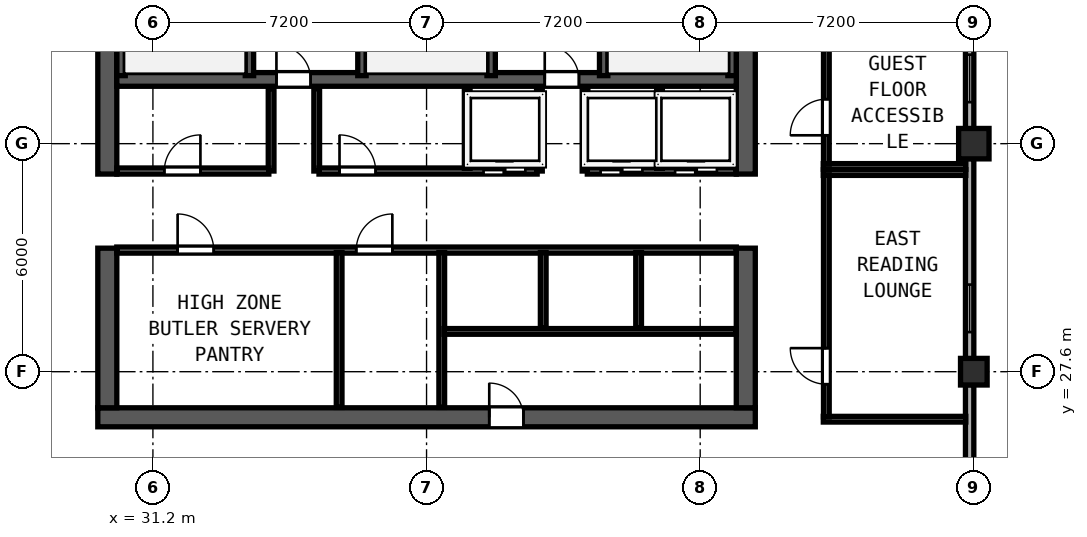
"""IFC4 building model, lengths in metres.
Left out: names, types, materials, properties, quantities, classifications, styles, units other than length and angle.
Written with IfcOpenShell. Run it as: python <this file> out.ifc"""

import sys

from ifc_helpers import new_model, si_unit, direction, frame, frame_2d, origin, origin_2d, place, context, subcontext, project, spatial, rectangle, hollow_rectangle, extrude, element, fill, save


model = new_model("IFC4")
c1 = context("Model", 3, precision=1e-05, world=origin(), true_north=direction((0.0, 1.0)))
c2 = subcontext(c1, "Body", "Model", "MODEL_VIEW")
j1 = project(units=[si_unit("LENGTHUNIT", "METRE"), si_unit("PLANEANGLEUNIT", "RADIAN")], contexts=[c1])
p1 = place(None, origin())
s1 = spatial("IfcSite", under=j1, at=p1, CompositionType="ELEMENT")
p2 = place(p1, origin())
s2 = spatial("IfcBuilding", under=s1, at=p2, CompositionType="ELEMENT")
p3 = place(p2, frame((0.0, 0.0, 262.15)))
s3 = spatial("IfcBuildingStorey", under=s2, at=p3, CompositionType="ELEMENT", Elevation=262.15)
p4 = place(p3, frame((29.75, 26.4, 0.0), z_axis=(0.0, 0.0, 1.0), x_axis=(1.0, 0.0, 0.0)))
e1 = element("IfcWall", 1, at=p4, inside=s3, PredefinedType="SHEAR", context=c2, shape_type="SweptSolid", body=[
    extrude(rectangle(XDim=17.3, YDim=0.5, at=frame_2d((8.65, 0.0))), origin(), (0.0, 0.0, 1.0), 3.67),
])
p5 = place(p4, frame((11.2, 0.0, 0.0), z_axis=(0.0, 0.0, 1.0), x_axis=(-1.0, 0.0, 0.0)))
e2 = element("IfcOpeningElement", 2, at=p5, cuts=e1, PredefinedType="OPENING", context=c2, shape_type="SweptSolid", body=[
    extrude(rectangle(XDim=0.9, YDim=2.1, at=frame_2d((0.45, 1.05))), frame((0.0, 0.26, 0.0), z_axis=(0.0, -1.0, 0.0), x_axis=(1.0, 0.0, 0.0)), (0.0, 0.0, 1.0), 0.52),
])
p6 = place(p3, frame((30.0, 26.65, 0.0), z_axis=(0.0, 0.0, 1.0), x_axis=(0.0, 1.0, 0.0)))
e3 = element("IfcWall", 3, at=p6, inside=s3, PredefinedType="SHEAR", context=c2, shape_type="SweptSolid", body=[
    extrude(rectangle(XDim=4.2, YDim=0.5, at=frame_2d((2.1, 0.0))), origin(), (0.0, 0.0, 1.0), 3.67),
])
p7 = place(p3, frame((30.0, 32.8, 0.0), z_axis=(0.0, 0.0, 1.0), x_axis=(0.0, 1.0, 0.0)))
e4 = element("IfcWall", 4, at=p7, inside=s3, PredefinedType="SHEAR", context=c2, shape_type="SweptSolid", body=[
    extrude(rectangle(XDim=10.15, YDim=0.5, at=frame_2d((5.075, 0.0))), origin(), (0.0, 0.0, 1.0), 3.67),
])
p8 = place(p3, frame((46.8, 26.65, 0.0), z_axis=(0.0, 0.0, 1.0), x_axis=(0.0, 1.0, 0.0)))
e5 = element("IfcWall", 5, at=p8, inside=s3, PredefinedType="SHEAR", context=c2, shape_type="SweptSolid", body=[
    extrude(rectangle(XDim=4.2, YDim=0.5, at=frame_2d((2.1, 0.0))), origin(), (0.0, 0.0, 1.0), 3.67),
])
p9 = place(p3, frame((46.8, 32.8, 0.0), z_axis=(0.0, 0.0, 1.0), x_axis=(0.0, 1.0, 0.0)))
e6 = element("IfcWall", 6, at=p9, inside=s3, PredefinedType="SHEAR", context=c2, shape_type="SweptSolid", body=[
    extrude(rectangle(XDim=10.15, YDim=0.5, at=frame_2d((5.075, 0.0))), origin(), (0.0, 0.0, 1.0), 3.67),
])
p10 = place(p3, frame((30.25, 35.29, 0.0), z_axis=(0.0, 0.0, 1.0), x_axis=(1.0, 0.0, 0.0)))
e7 = element("IfcWall", 7, at=p10, inside=s3, PredefinedType="SHEAR", context=c2, shape_type="SweptSolid", body=[
    extrude(rectangle(XDim=16.3, YDim=0.36, at=frame_2d((8.15, 0.0))), origin(), (0.0, 0.0, 1.0), 3.67),
])
p11 = place(p10, frame((5.1, 0.0, 0.0), z_axis=(0.0, 0.0, 1.0), x_axis=(-1.0, 0.0, 0.0)))
e8 = element("IfcOpeningElement", 8, at=p11, cuts=e7, PredefinedType="OPENING", context=c2, shape_type="SweptSolid", body=[
    extrude(rectangle(XDim=0.9, YDim=2.1, at=frame_2d((0.45, 1.05))), frame((0.0, 0.19, 0.0), z_axis=(0.0, -1.0, 0.0), x_axis=(1.0, 0.0, 0.0)), (0.0, 0.0, 1.0), 0.38),
])
p12 = place(p10, frame((12.16, 0.0, 0.0), z_axis=(0.0, 0.0, 1.0), x_axis=(-1.0, 0.0, 0.0)))
e9 = element("IfcOpeningElement", 9, at=p12, cuts=e7, PredefinedType="OPENING", context=c2, shape_type="SweptSolid", body=[
    extrude(rectangle(XDim=0.9, YDim=2.1, at=frame_2d((0.45, 1.05))), frame((0.0, 0.19, 0.0), z_axis=(0.0, -1.0, 0.0), x_axis=(1.0, 0.0, 0.0)), (0.0, 0.0, 1.0), 0.38),
])
for number, where, z_axis, x_axis in (
    (10, (30.362, 35.39, 0.0), (0.0, 0.0, 1.0), (0.0, 1.0, 0.0)),
    (11, (33.74, 35.39, 0.0), (0.0, 0.0, 1.0), (0.0, 1.0, 0.0)),
    (12, (36.7, 35.39, 0.0), (0.0, 0.0, 1.0), (0.0, 1.0, 0.0)),
    (13, (40.1, 35.39, 0.0), (0.0, 0.0, 1.0), (0.0, 1.0, 0.0)),
    (14, (43.06, 35.39, 0.0), (0.0, 0.0, 1.0), (0.0, 1.0, 0.0)),
    (15, (46.438, 35.39, 0.0), (0.0, 0.0, 1.0), (0.0, 1.0, 0.0)),
):
    element("IfcWall", number, at=place(p3, frame(where, z_axis=z_axis, x_axis=x_axis)), inside=s3, PredefinedType="SHEAR", context=c2, shape_type="SweptSolid", body=[
        extrude(rectangle(XDim=7.56, YDim=0.22, at=frame_2d((3.78, 0.0))), origin(), (0.0, 0.0, 1.0), 3.67),
    ])
p13 = place(p3, frame((52.8, 33.6, 0.0), z_axis=(0.0, 0.0, 1.0), x_axis=(1.0, 0.0, 0.0)))
e16 = element("IfcColumn", 16, at=p13, inside=s3, PredefinedType="COLUMN", context=c2, shape_type="SweptSolid", body=[
    extrude(hollow_rectangle(XDim=0.8, YDim=0.8, WallThickness=0.03, at=origin_2d()), origin(), (0.0, 0.0, 1.0), 3.85),
])
p14 = place(p3, frame((52.8, 27.6, 0.0), z_axis=(0.0, 0.0, 1.0), x_axis=(1.0, 0.0, 0.0)))
e17 = element("IfcColumn", 17, at=p14, inside=s3, PredefinedType="COLUMN", context=c2, shape_type="SweptSolid", body=[
    extrude(hollow_rectangle(XDim=0.7, YDim=0.7, WallThickness=0.026, at=origin_2d()), origin(), (0.0, 0.0, 1.0), 3.85),
])
p15 = place(p3, frame((52.69, 21.992, 0.0), z_axis=(0.0, 0.0, 1.0), x_axis=(0.0, 1.0, 0.0)))
e18 = element("IfcWall", 18, at=p15, inside=s3, PredefinedType="SOLIDWALL", context=c2, shape_type="SweptSolid", body=[
    extrude(rectangle(XDim=5.266, YDim=0.22, at=frame_2d((2.633, 0.0))), origin(), (0.0, 0.0, 1.0), 3.315),
])
p16 = place(p15, frame((0.7, 0.0, 0.85)))
e19 = element("IfcOpeningElement", 19, at=p16, cuts=e18, PredefinedType="OPENING", context=c2, shape_type="SweptSolid", body=[
    extrude(rectangle(XDim=1.25, YDim=1.95, at=frame_2d((0.625, 0.975))), frame((0.0, 0.12, 0.0), z_axis=(0.0, -1.0, 0.0), x_axis=(1.0, 0.0, 0.0)), (0.0, 0.0, 1.0), 0.24),
])
p17 = place(p3, frame((52.69, 27.942, 0.0), z_axis=(0.0, 0.0, 1.0), x_axis=(0.0, 1.0, 0.0)))
e20 = element("IfcWall", 20, at=p17, inside=s3, PredefinedType="SOLIDWALL", context=c2, shape_type="SweptSolid", body=[
    extrude(rectangle(XDim=5.266, YDim=0.22, at=frame_2d((2.633, 0.0))), origin(), (0.0, 0.0, 1.0), 3.315),
])
p18 = place(p17, frame((0.7, 0.0, 0.85)))
e21 = element("IfcOpeningElement", 21, at=p18, cuts=e20, PredefinedType="OPENING", context=c2, shape_type="SweptSolid", body=[
    extrude(rectangle(XDim=1.25, YDim=1.95, at=frame_2d((0.625, 0.975))), frame((0.0, 0.12, 0.0), z_axis=(0.0, -1.0, 0.0), x_axis=(1.0, 0.0, 0.0)), (0.0, 0.0, 1.0), 0.24),
])
p19 = place(p3, frame((52.69, 33.992, 0.0), z_axis=(0.0, 0.0, 1.0), x_axis=(0.0, 1.0, 0.0)))
e22 = element("IfcWall", 22, at=p19, inside=s3, PredefinedType="SOLIDWALL", context=c2, shape_type="SweptSolid", body=[
    extrude(rectangle(XDim=5.266, YDim=0.22, at=frame_2d((2.633, 0.0))), origin(), (0.0, 0.0, 1.0), 3.315),
])
p20 = place(p19, frame((0.7, 0.0, 0.85)))
e23 = element("IfcOpeningElement", 23, at=p20, cuts=e22, PredefinedType="OPENING", context=c2, shape_type="SweptSolid", body=[
    extrude(rectangle(XDim=1.25, YDim=1.95, at=frame_2d((0.625, 0.975))), frame((0.0, 0.12, 0.0), z_axis=(0.0, -1.0, 0.0), x_axis=(1.0, 0.0, 0.0)), (0.0, 0.0, 1.0), 0.24),
])
for number, where, z_axis, x_axis in (
    (24, (34.31, 32.88, 0.0), (0.0, 0.0, 1.0), (0.0, 1.0, 0.0)),
    (25, (35.51, 32.88, 0.0), (0.0, 0.0, 1.0), (0.0, 1.0, 0.0)),
    (26, (41.37, 32.88, 0.0), (0.0, 0.0, 1.0), (0.0, 1.0, 0.0)),
    (27, (42.57, 32.88, 0.0), (0.0, 0.0, 1.0), (0.0, 1.0, 0.0)),
):
    element("IfcWall", number, at=place(p3, frame(where, z_axis=z_axis, x_axis=x_axis)), inside=s3, PredefinedType="SOLIDWALL", context=c2, shape_type="SweptSolid", body=[
        extrude(rectangle(XDim=2.17, YDim=0.15, at=frame_2d((1.085, 0.0))), origin(), (0.0, 0.0, 1.0), 3.67),
    ])
p21 = place(p3, frame((30.25, 32.88, 0.0), z_axis=(0.0, 0.0, 1.0), x_axis=(1.0, 0.0, 0.0)))
e28 = element("IfcWall", 28, at=p21, inside=s3, PredefinedType="SOLIDWALL", context=c2, shape_type="SweptSolid", body=[
    extrude(rectangle(XDim=4.0, YDim=0.16, at=frame_2d((2.0, 0.0))), origin(), (0.0, 0.0, 1.0), 3.67),
])
p22 = place(p21, frame((2.2, 0.0, 0.0), z_axis=(0.0, 0.0, 1.0), x_axis=(-1.0, 0.0, 0.0)))
e29 = element("IfcOpeningElement", 29, at=p22, cuts=e28, PredefinedType="OPENING", context=c2, shape_type="SweptSolid", body=[
    extrude(rectangle(XDim=0.95, YDim=2.12, at=frame_2d((0.475, 1.06))), frame((0.0, 0.09, 0.0), z_axis=(0.0, -1.0, 0.0), x_axis=(1.0, 0.0, 0.0)), (0.0, 0.0, 1.0), 0.18),
])
p23 = place(p3, frame((35.57, 32.88, 0.0), z_axis=(0.0, 0.0, 1.0), x_axis=(1.0, 0.0, 0.0)))
e30 = element("IfcWall", 30, at=p23, inside=s3, PredefinedType="SOLIDWALL", context=c2, shape_type="SweptSolid", body=[
    extrude(rectangle(XDim=5.74, YDim=0.16, at=frame_2d((2.87, 0.0))), origin(), (0.0, 0.0, 1.0), 3.67),
])
p24 = place(p23, frame((1.49, 0.0, 0.0), z_axis=(0.0, 0.0, 1.0), x_axis=(-1.0, 0.0, 0.0)))
e31 = element("IfcOpeningElement", 31, at=p24, cuts=e30, PredefinedType="OPENING", context=c2, shape_type="SweptSolid", body=[
    extrude(rectangle(XDim=0.95, YDim=2.12, at=frame_2d((0.475, 1.06))), frame((0.0, 0.09, 0.0), z_axis=(0.0, -1.0, 0.0), x_axis=(1.0, 0.0, 0.0)), (0.0, 0.0, 1.0), 0.18),
])
p25 = place(p23, frame((5.43, 0.0, 0.0), z_axis=(0.0, 0.0, 1.0), x_axis=(-1.0, 0.0, 0.0)))
e32 = element("IfcOpeningElement", 32, at=p25, cuts=e30, PredefinedType="OPENING", context=c2, shape_type="SweptSolid", body=[
    extrude(rectangle(XDim=1.1, YDim=2.2, at=frame_2d((0.55, 1.1))), frame((0.0, 0.09, 0.0), z_axis=(0.0, -1.0, 0.0), x_axis=(1.0, 0.0, 0.0)), (0.0, 0.0, 1.0), 0.18),
])
p26 = place(p3, frame((42.63, 32.88, 0.0), z_axis=(0.0, 0.0, 1.0), x_axis=(1.0, 0.0, 0.0)))
e33 = element("IfcWall", 33, at=p26, inside=s3, PredefinedType="SOLIDWALL", context=c2, shape_type="SweptSolid", body=[
    extrude(rectangle(XDim=3.92, YDim=0.16, at=frame_2d((1.96, 0.0))), origin(), (0.0, 0.0, 1.0), 3.67),
])
p27 = place(p26, frame((1.45, 0.0, 0.0), z_axis=(0.0, 0.0, 1.0), x_axis=(-1.0, 0.0, 0.0)))
e34 = element("IfcOpeningElement", 34, at=p27, cuts=e33, PredefinedType="OPENING", context=c2, shape_type="SweptSolid", body=[
    extrude(rectangle(XDim=1.1, YDim=2.2, at=frame_2d((0.55, 1.1))), frame((0.0, 0.09, 0.0), z_axis=(0.0, -1.0, 0.0), x_axis=(1.0, 0.0, 0.0)), (0.0, 0.0, 1.0), 0.18),
])
p28 = place(p26, frame((3.41, 0.0, 0.0), z_axis=(0.0, 0.0, 1.0), x_axis=(-1.0, 0.0, 0.0)))
e35 = element("IfcOpeningElement", 35, at=p28, cuts=e33, PredefinedType="OPENING", context=c2, shape_type="SweptSolid", body=[
    extrude(rectangle(XDim=1.1, YDim=2.2, at=frame_2d((0.55, 1.1))), frame((0.0, 0.09, 0.0), z_axis=(0.0, -1.0, 0.0), x_axis=(1.0, 0.0, 0.0)), (0.0, 0.0, 1.0), 0.18),
])
for number, where, z_axis, x_axis in (
    (36, (39.47, 32.95, 0.0), (0.0, 0.0, 1.0), (0.0, 1.0, 0.0)),
    (37, (44.53, 32.95, 0.0), (0.0, 0.0, 1.0), (0.0, 1.0, 0.0)),
):
    element("IfcWall", number, at=place(p3, frame(where, z_axis=z_axis, x_axis=x_axis)), inside=s3, PredefinedType="SOLIDWALL", context=c2, shape_type="SweptSolid", body=[
        extrude(rectangle(XDim=2.05, YDim=0.15, at=frame_2d((1.025, 0.0))), origin(), (0.0, 0.0, 1.0), 3.67),
    ])
p29 = place(p3, frame((30.25, 30.8, 0.0), z_axis=(0.0, 0.0, 1.0), x_axis=(1.0, 0.0, 0.0)))
e38 = element("IfcWall", 38, at=p29, inside=s3, PredefinedType="SOLIDWALL", context=c2, shape_type="SweptSolid", body=[
    extrude(rectangle(XDim=16.3, YDim=0.16, at=frame_2d((8.15, 0.0))), origin(), (0.0, 0.0, 1.0), 3.67),
])
p30 = place(p29, frame((1.6, 0.0, 0.0)))
e39 = element("IfcOpeningElement", 39, at=p30, cuts=e38, PredefinedType="OPENING", context=c2, shape_type="SweptSolid", body=[
    extrude(rectangle(XDim=0.95, YDim=2.12, at=frame_2d((0.475, 1.06))), frame((0.0, 0.09, 0.0), z_axis=(0.0, -1.0, 0.0), x_axis=(1.0, 0.0, 0.0)), (0.0, 0.0, 1.0), 0.18),
])
p31 = place(p29, frame((6.3, 0.0, 0.0)))
e40 = element("IfcOpeningElement", 40, at=p31, cuts=e38, PredefinedType="OPENING", context=c2, shape_type="SweptSolid", body=[
    extrude(rectangle(XDim=0.95, YDim=2.12, at=frame_2d((0.475, 1.06))), frame((0.0, 0.09, 0.0), z_axis=(0.0, -1.0, 0.0), x_axis=(1.0, 0.0, 0.0)), (0.0, 0.0, 1.0), 0.18),
])
p32 = place(p3, frame((38.8, 26.66, 0.0), z_axis=(0.0, 0.0, 1.0), x_axis=(0.0, 1.0, 0.0)))
e41 = element("IfcWall", 41, at=p32, inside=s3, PredefinedType="SOLIDWALL", context=c2, shape_type="SweptSolid", body=[
    extrude(rectangle(XDim=4.075, YDim=0.15, at=frame_2d((2.038, 0.0))), origin(), (0.0, 0.0, 1.0), 3.67),
])
p33 = place(p3, frame((36.1, 26.66, 0.0), z_axis=(0.0, 0.0, 1.0), x_axis=(0.0, 1.0, 0.0)))
e42 = element("IfcWall", 42, at=p33, inside=s3, PredefinedType="PARTITIONING", context=c2, shape_type="SweptSolid", body=[
    extrude(rectangle(XDim=4.075, YDim=0.15, at=frame_2d((2.038, 0.0))), origin(), (0.0, 0.0, 1.0), 3.67),
])
p34 = place(p3, frame((38.86, 28.66, 0.0), z_axis=(0.0, 0.0, 1.0), x_axis=(1.0, 0.0, 0.0)))
e43 = element("IfcWall", 43, at=p34, inside=s3, PredefinedType="PARTITIONING", context=c2, shape_type="SweptSolid", body=[
    extrude(rectangle(XDim=7.69, YDim=0.15, at=frame_2d((3.845, 0.0))), origin(), (0.0, 0.0, 1.0), 3.67),
])
for number, where, z_axis, x_axis in (
    (44, (41.47, 28.75, 0.0), (0.0, 0.0, 1.0), (0.0, 1.0, 0.0)),
    (45, (43.98, 28.75, 0.0), (0.0, 0.0, 1.0), (0.0, 1.0, 0.0)),
):
    element("IfcWall", number, at=place(p3, frame(where, z_axis=z_axis, x_axis=x_axis)), inside=s3, PredefinedType="SOLIDWALL", context=c2, shape_type="SweptSolid", body=[
        extrude(rectangle(XDim=1.985, YDim=0.15, at=frame_2d((0.993, 0.0))), origin(), (0.0, 0.0, 1.0), 3.67),
    ])
p35 = place(p3, frame((48.84, 33.0, 0.0), z_axis=(0.0, 0.0, 1.0), x_axis=(1.0, 0.0, 0.0)))
e46 = element("IfcWall", 46, at=p35, inside=s3, PredefinedType="PARTITIONING", context=c2, shape_type="SweptSolid", body=[
    extrude(rectangle(XDim=3.748, YDim=0.15, at=frame_2d((1.874, 0.0))), origin(), (0.0, 0.0, 1.0), 3.67),
])
p36 = place(p3, frame((48.92, 33.06, 0.0), z_axis=(0.0, 0.0, 1.0), x_axis=(0.0, 1.0, 0.0)))
e47 = element("IfcWall", 47, at=p36, inside=s3, PredefinedType="PARTITIONING", context=c2, shape_type="SweptSolid", body=[
    extrude(rectangle(XDim=3.18, YDim=0.15, at=frame_2d((1.59, 0.0))), origin(), (0.0, 0.0, 1.0), 3.67),
])
p37 = place(p36, frame((0.76, 0.0, 0.0)))
e48 = element("IfcOpeningElement", 48, at=p37, cuts=e47, PredefinedType="OPENING", context=c2, shape_type="SweptSolid", body=[
    extrude(rectangle(XDim=0.95, YDim=2.12, at=frame_2d((0.475, 1.06))), frame((0.0, 0.085, 0.0), z_axis=(0.0, -1.0, 0.0), x_axis=(1.0, 0.0, 0.0)), (0.0, 0.0, 1.0), 0.17),
])
for number, where, z_axis, x_axis in (
    (49, (48.84, 32.84, 0.0), (0.0, 0.0, 1.0), (1.0, 0.0, 0.0)),
    (50, (48.84, 26.35, 0.0), (0.0, 0.0, 1.0), (1.0, 0.0, 0.0)),
):
    element("IfcWall", number, at=place(p3, frame(where, z_axis=z_axis, x_axis=x_axis)), inside=s3, PredefinedType="PARTITIONING", context=c2, shape_type="SweptSolid", body=[
        extrude(rectangle(XDim=3.748, YDim=0.15, at=frame_2d((1.874, 0.0))), origin(), (0.0, 0.0, 1.0), 3.67),
    ])
p38 = place(p3, frame((48.92, 26.41, 0.0), z_axis=(0.0, 0.0, 1.0), x_axis=(0.0, 1.0, 0.0)))
e51 = element("IfcWall", 51, at=p38, inside=s3, PredefinedType="PARTITIONING", context=c2, shape_type="SweptSolid", body=[
    extrude(rectangle(XDim=6.37, YDim=0.15, at=frame_2d((3.185, 0.0))), origin(), (0.0, 0.0, 1.0), 3.67),
])
p39 = place(p38, frame((0.86, 0.0, 0.0)))
e52 = element("IfcOpeningElement", 52, at=p39, cuts=e51, PredefinedType="OPENING", context=c2, shape_type="SweptSolid", body=[
    extrude(rectangle(XDim=0.95, YDim=2.12, at=frame_2d((0.475, 1.06))), frame((0.0, 0.085, 0.0), z_axis=(0.0, -1.0, 0.0), x_axis=(1.0, 0.0, 0.0)), (0.0, 0.0, 1.0), 0.17),
])
p40 = place(p18, origin())
e53 = element("IfcWindow", 53, at=p40, inside=s3, PartitioningType="SINGLE_PANEL", PredefinedType="WINDOW", context=c2, shape_type="SweptSolid", body=[
    extrude(rectangle(XDim=1.25, YDim=1.95, at=frame_2d((0.625, 0.975))), frame((0.0, 0.03, 0.0), z_axis=(0.0, -1.0, 0.0), x_axis=(1.0, 0.0, 0.0)), (0.0, 0.0, 1.0), 0.06),
])
fill(e21, e53)
p41 = place(p20, origin())
e54 = element("IfcWindow", 54, at=p41, inside=s3, PartitioningType="SINGLE_PANEL", PredefinedType="WINDOW", context=c2, shape_type="SweptSolid", body=[
    extrude(rectangle(XDim=1.25, YDim=1.95, at=frame_2d((0.625, 0.975))), frame((0.0, 0.03, 0.0), z_axis=(0.0, -1.0, 0.0), x_axis=(1.0, 0.0, 0.0)), (0.0, 0.0, 1.0), 0.06),
])
fill(e23, e54)
p42 = place(p11, origin())
e55 = element("IfcDoor", 55, at=p42, inside=s3, OperationType="SINGLE_SWING_RIGHT", PredefinedType="DOOR", context=c2, shape_type="SweptSolid", body=[
    extrude(rectangle(XDim=0.9, YDim=2.1, at=frame_2d((0.45, 1.05))), frame((0.0, 0.025, 0.0), z_axis=(0.0, -1.0, 0.0), x_axis=(1.0, 0.0, 0.0)), (0.0, 0.0, 1.0), 0.05),
])
fill(e8, e55)
p43 = place(p12, origin())
e56 = element("IfcDoor", 56, at=p43, inside=s3, OperationType="SINGLE_SWING_RIGHT", PredefinedType="DOOR", context=c2, shape_type="SweptSolid", body=[
    extrude(rectangle(XDim=0.9, YDim=2.1, at=frame_2d((0.45, 1.05))), frame((0.0, 0.025, 0.0), z_axis=(0.0, -1.0, 0.0), x_axis=(1.0, 0.0, 0.0)), (0.0, 0.0, 1.0), 0.05),
])
fill(e9, e56)
p44 = place(p22, origin())
e57 = element("IfcDoor", 57, at=p44, inside=s3, OperationType="SINGLE_SWING_LEFT", PredefinedType="DOOR", context=c2, shape_type="SweptSolid", body=[
    extrude(rectangle(XDim=0.95, YDim=2.12, at=frame_2d((0.475, 1.06))), frame((0.0, 0.025, 0.0), z_axis=(0.0, -1.0, 0.0), x_axis=(1.0, 0.0, 0.0)), (0.0, 0.0, 1.0), 0.05),
])
fill(e29, e57)
p45 = place(p24, origin())
e58 = element("IfcDoor", 58, at=p45, inside=s3, OperationType="SINGLE_SWING_RIGHT", PredefinedType="DOOR", context=c2, shape_type="SweptSolid", body=[
    extrude(rectangle(XDim=0.95, YDim=2.12, at=frame_2d((0.475, 1.06))), frame((0.0, 0.025, 0.0), z_axis=(0.0, -1.0, 0.0), x_axis=(1.0, 0.0, 0.0)), (0.0, 0.0, 1.0), 0.05),
])
fill(e31, e58)
p46 = place(p25, origin())
e59 = element("IfcDoor", 59, at=p46, inside=s3, OperationType="SLIDING_TO_RIGHT", PredefinedType="DOOR", context=c2, shape_type="SweptSolid", body=[
    extrude(rectangle(XDim=1.1, YDim=2.2, at=frame_2d((0.55, 1.1))), frame((0.0, 0.025, 0.0), z_axis=(0.0, -1.0, 0.0), x_axis=(1.0, 0.0, 0.0)), (0.0, 0.0, 1.0), 0.05),
])
fill(e32, e59)
p47 = place(p27, origin())
e60 = element("IfcDoor", 60, at=p47, inside=s3, OperationType="SLIDING_TO_RIGHT", PredefinedType="DOOR", context=c2, shape_type="SweptSolid", body=[
    extrude(rectangle(XDim=1.1, YDim=2.2, at=frame_2d((0.55, 1.1))), frame((0.0, 0.025, 0.0), z_axis=(0.0, -1.0, 0.0), x_axis=(1.0, 0.0, 0.0)), (0.0, 0.0, 1.0), 0.05),
])
fill(e34, e60)
p48 = place(p28, origin())
e61 = element("IfcDoor", 61, at=p48, inside=s3, OperationType="SLIDING_TO_RIGHT", PredefinedType="DOOR", context=c2, shape_type="SweptSolid", body=[
    extrude(rectangle(XDim=1.1, YDim=2.2, at=frame_2d((0.55, 1.1))), frame((0.0, 0.025, 0.0), z_axis=(0.0, -1.0, 0.0), x_axis=(1.0, 0.0, 0.0)), (0.0, 0.0, 1.0), 0.05),
])
fill(e35, e61)
p49 = place(p30, origin())
e62 = element("IfcDoor", 62, at=p49, inside=s3, OperationType="SINGLE_SWING_LEFT", PredefinedType="DOOR", context=c2, shape_type="SweptSolid", body=[
    extrude(rectangle(XDim=0.95, YDim=2.12, at=frame_2d((0.475, 1.06))), frame((0.0, 0.025, 0.0), z_axis=(0.0, -1.0, 0.0), x_axis=(1.0, 0.0, 0.0)), (0.0, 0.0, 1.0), 0.05),
])
fill(e39, e62)
p50 = place(p31, origin())
e63 = element("IfcDoor", 63, at=p50, inside=s3, OperationType="SINGLE_SWING_RIGHT", PredefinedType="DOOR", context=c2, shape_type="SweptSolid", body=[
    extrude(rectangle(XDim=0.95, YDim=2.12, at=frame_2d((0.475, 1.06))), frame((0.0, 0.025, 0.0), z_axis=(0.0, -1.0, 0.0), x_axis=(1.0, 0.0, 0.0)), (0.0, 0.0, 1.0), 0.05),
])
fill(e40, e63)
p51 = place(p5, origin())
e64 = element("IfcDoor", 64, at=p51, inside=s3, OperationType="SINGLE_SWING_RIGHT", PredefinedType="DOOR", context=c2, shape_type="SweptSolid", body=[
    extrude(rectangle(XDim=0.9, YDim=2.1, at=frame_2d((0.45, 1.05))), frame((0.0, -0.195, 0.0), z_axis=(0.0, -1.0, 0.0), x_axis=(1.0, 0.0, 0.0)), (0.0, 0.0, 1.0), 0.05),
])
fill(e2, e64)
p52 = place(p37, origin())
e65 = element("IfcDoor", 65, at=p52, inside=s3, OperationType="SINGLE_SWING_LEFT", PredefinedType="DOOR", context=c2, shape_type="SweptSolid", body=[
    extrude(rectangle(XDim=0.95, YDim=2.12, at=frame_2d((0.475, 1.06))), frame((0.0, 0.025, 0.0), z_axis=(0.0, -1.0, 0.0), x_axis=(1.0, 0.0, 0.0)), (0.0, 0.0, 1.0), 0.05),
])
fill(e48, e65)
p53 = place(p39, origin())
e66 = element("IfcDoor", 66, at=p53, inside=s3, OperationType="SINGLE_SWING_RIGHT", PredefinedType="DOOR", context=c2, shape_type="SweptSolid", body=[
    extrude(rectangle(XDim=0.95, YDim=2.12, at=frame_2d((0.475, 1.06))), frame((0.0, 0.025, 0.0), z_axis=(0.0, -1.0, 0.0), x_axis=(1.0, 0.0, 0.0)), (0.0, 0.0, 1.0), 0.05),
])
fill(e52, e66)
save(model, sys.argv[1])
